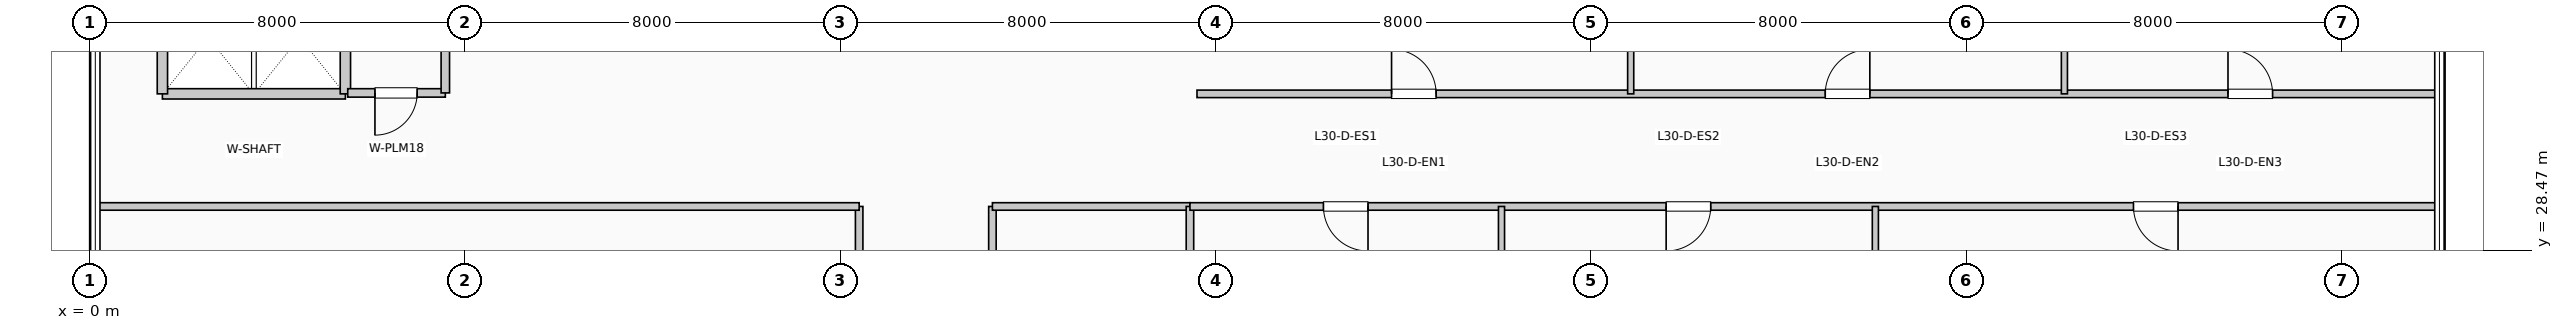
"""IFC4 building model, lengths in metres.
Left out: names, types, materials, properties, quantities, classifications, styles, units other than length and angle.
Written with IfcOpenShell. Run it as: python <this file> out.ifc"""

import sys

from ifc_helpers import new_model, si_unit, direction, frame, frame_2d, origin, place, context, subcontext, project, spatial, rectangle, extrude, element, fill, save


model = new_model("IFC4")
c1 = context("Model", 3, precision=1e-05, world=origin(), true_north=direction((0.0, 1.0)))
c2 = subcontext(c1, "Body", "Model", "MODEL_VIEW")
j1 = project(units=[si_unit("LENGTHUNIT", "METRE"), si_unit("PLANEANGLEUNIT", "RADIAN")], contexts=[c1])
p1 = place(None, origin())
s1 = spatial("IfcSite", under=j1, at=p1, CompositionType="ELEMENT")
p2 = place(p1, origin())
s2 = spatial("IfcBuilding", under=s1, at=p2, CompositionType="ELEMENT")
p3 = place(p2, frame((0.0, 0.0, 126.39)))
s3 = spatial("IfcBuildingStorey", under=s2, at=p3, CompositionType="ELEMENT", Elevation=126.39)
p4 = place(p3, frame((1.55, 31.8, 0.0), z_axis=(0.0, 0.0, 1.0), x_axis=(1.0, 0.0, 0.0)))
e1 = element("IfcWall", 1, at=p4, inside=s3, PredefinedType="PARTITIONING", context=c2, shape_type="SweptSolid", body=[
    extrude(rectangle(XDim=3.9, YDim=0.22, at=frame_2d((1.95, 0.0))), origin(), (0.0, 0.0, 1.0), 3.71),
])
for number, where, z_axis, x_axis in (
    (2, (1.55, 31.8, 0.0), (0.0, 0.0, 1.0), (0.0, 1.0, 0.0)),
    (3, (5.45, 31.8, 0.0), (0.0, 0.0, 1.0), (0.0, 1.0, 0.0)),
):
    element("IfcWall", number, at=place(p3, frame(where, z_axis=z_axis, x_axis=x_axis)), inside=s3, PredefinedType="PARTITIONING", context=c2, shape_type="SweptSolid", body=[
        extrude(rectangle(XDim=2.38, YDim=0.22, at=frame_2d((1.19, 0.0))), origin(), (0.0, 0.0, 1.0), 3.71),
    ])
p5 = place(p3, frame((5.5, 31.82, 0.0), z_axis=(0.0, 0.0, 1.0), x_axis=(1.0, 0.0, 0.0)))
e4 = element("IfcWall", 4, at=p5, inside=s3, PredefinedType="PLUMBINGWALL", context=c2, shape_type="SweptSolid", body=[
    extrude(rectangle(XDim=2.08, YDim=0.18, at=frame_2d((1.04, 0.0))), origin(), (0.0, 0.0, 1.0), 3.71),
])
p6 = place(p5, frame((1.48, 0.0, 0.0), z_axis=(0.0, 0.0, 1.0), x_axis=(-1.0, 0.0, 0.0)))
e5 = element("IfcOpeningElement", 5, at=p6, cuts=e4, PredefinedType="OPENING", context=c2, shape_type="SweptSolid", body=[
    extrude(rectangle(XDim=0.9, YDim=2.1, at=frame_2d((0.45, 1.05))), frame((0.0, 0.1, 0.0), z_axis=(0.0, -1.0, 0.0), x_axis=(1.0, 0.0, 0.0)), (0.0, 0.0, 1.0), 0.2),
])
p7 = place(p3, frame((7.58, 31.82, 0.0), z_axis=(0.0, 0.0, 1.0), x_axis=(0.0, 1.0, 0.0)))
e6 = element("IfcWall", 6, at=p7, inside=s3, PredefinedType="PLUMBINGWALL", context=c2, shape_type="SweptSolid", body=[
    extrude(rectangle(XDim=2.36, YDim=0.18, at=frame_2d((1.18, 0.0))), origin(), (0.0, 0.0, 1.0), 3.71),
])
p8 = place(p3, frame((16.4, 7.2, 0.0), z_axis=(0.0, 0.0, 1.0), x_axis=(0.0, 1.0, 0.0)))
e7 = element("IfcWall", 7, at=p8, inside=s3, PredefinedType="PARTITIONING", context=c2, shape_type="SweptSolid", body=[
    extrude(rectangle(XDim=22.2, YDim=0.16, at=frame_2d((11.1, 0.0))), origin(), (0.0, 0.0, 1.0), 3.71),
])
p9 = place(p8, frame((6.247, 0.0, 0.0), z_axis=(0.0, 0.0, 1.0), x_axis=(-1.0, 0.0, 0.0)))
e8 = element("IfcOpeningElement", 8, at=p9, cuts=e7, PredefinedType="OPENING", context=c2, shape_type="SweptSolid", body=[
    extrude(rectangle(XDim=0.95, YDim=2.15, at=frame_2d((0.475, 1.075))), frame((0.0, 0.09, 0.0), z_axis=(0.0, -1.0, 0.0), x_axis=(1.0, 0.0, 0.0)), (0.0, 0.0, 1.0), 0.18),
])
p10 = place(p8, frame((17.347, 0.0, 0.0), z_axis=(0.0, 0.0, 1.0), x_axis=(-1.0, 0.0, 0.0)))
e9 = element("IfcOpeningElement", 9, at=p10, cuts=e7, PredefinedType="OPENING", context=c2, shape_type="SweptSolid", body=[
    extrude(rectangle(XDim=0.95, YDim=2.15, at=frame_2d((0.475, 1.075))), frame((0.0, 0.09, 0.0), z_axis=(0.0, -1.0, 0.0), x_axis=(1.0, 0.0, 0.0)), (0.0, 0.0, 1.0), 0.18),
])
p11 = place(p3, frame((19.24, 7.2, 0.0), z_axis=(0.0, 0.0, 1.0), x_axis=(0.0, 1.0, 0.0)))
e10 = element("IfcWall", 10, at=p11, inside=s3, PredefinedType="PARTITIONING", context=c2, shape_type="SweptSolid", body=[
    extrude(rectangle(XDim=22.2, YDim=0.16, at=frame_2d((11.1, 0.0))), origin(), (0.0, 0.0, 1.0), 3.71),
])
p12 = place(p11, frame((4.52, 0.0, 0.0)))
e11 = element("IfcOpeningElement", 11, at=p12, cuts=e10, PredefinedType="OPENING", context=c2, shape_type="SweptSolid", body=[
    extrude(rectangle(XDim=0.95, YDim=2.15, at=frame_2d((0.475, 1.075))), frame((0.0, 0.09, 0.0), z_axis=(0.0, -1.0, 0.0), x_axis=(1.0, 0.0, 0.0)), (0.0, 0.0, 1.0), 0.18),
])
p13 = place(p11, frame((15.62, 0.0, 0.0)))
e12 = element("IfcOpeningElement", 12, at=p13, cuts=e10, PredefinedType="OPENING", context=c2, shape_type="SweptSolid", body=[
    extrude(rectangle(XDim=0.95, YDim=2.15, at=frame_2d((0.475, 1.075))), frame((0.0, 0.09, 0.0), z_axis=(0.0, -1.0, 0.0), x_axis=(1.0, 0.0, 0.0)), (0.0, 0.0, 1.0), 0.18),
])
p14 = place(p3, frame((0.19, 29.4, 0.0), z_axis=(0.0, 0.0, 1.0), x_axis=(1.0, 0.0, 0.0)))
e13 = element("IfcWall", 13, at=p14, inside=s3, PredefinedType="PARTITIONING", context=c2, shape_type="SweptSolid", body=[
    extrude(rectangle(XDim=16.21, YDim=0.16, at=frame_2d((8.105, 0.0))), origin(), (0.0, 0.0, 1.0), 3.365),
])
p15 = place(p3, frame((19.24, 29.4, 0.0), z_axis=(0.0, 0.0, 1.0), x_axis=(1.0, 0.0, 0.0)))
e14 = element("IfcWall", 14, at=p15, inside=s3, PredefinedType="PARTITIONING", context=c2, shape_type="SweptSolid", body=[
    extrude(rectangle(XDim=4.21, YDim=0.16, at=frame_2d((2.105, 0.0))), origin(), (0.0, 0.0, 1.0), 3.71),
])
p16 = place(p3, frame((23.45, 0.19, 0.0), z_axis=(0.0, 0.0, 1.0), x_axis=(0.0, 1.0, 0.0)))
e15 = element("IfcWall", 15, at=p16, inside=s3, PredefinedType="PARTITIONING", context=c2, shape_type="SweptSolid", body=[
    extrude(rectangle(XDim=29.21, YDim=0.16, at=frame_2d((14.605, 0.0))), origin(), (0.0, 0.0, 1.0), 3.045),
])
p17 = place(p3, frame((23.45, 29.4, 0.0), z_axis=(0.0, 0.0, 1.0), x_axis=(1.0, 0.0, 0.0)))
e16 = element("IfcWall", 16, at=p17, inside=s3, PredefinedType="PARTITIONING", context=c2, shape_type="SweptSolid", body=[
    extrude(rectangle(XDim=26.56, YDim=0.16, at=frame_2d((13.28, 0.0))), origin(), (0.0, 0.0, 1.0), 3.365),
])
p18 = place(p17, frame((3.795, 0.0, 0.0), z_axis=(0.0, 0.0, 1.0), x_axis=(-1.0, 0.0, 0.0)))
e17 = element("IfcOpeningElement", 17, at=p18, cuts=e16, PredefinedType="OPENING", context=c2, shape_type="SweptSolid", body=[
    extrude(rectangle(XDim=0.95, YDim=2.15, at=frame_2d((0.475, 1.075))), frame((0.0, 0.09, 0.0), z_axis=(0.0, -1.0, 0.0), x_axis=(1.0, 0.0, 0.0)), (0.0, 0.0, 1.0), 0.18),
])
p19 = place(p17, frame((11.099, 0.0, 0.0), z_axis=(0.0, 0.0, 1.0), x_axis=(-1.0, 0.0, 0.0)))
e18 = element("IfcOpeningElement", 18, at=p19, cuts=e16, PredefinedType="OPENING", context=c2, shape_type="SweptSolid", body=[
    extrude(rectangle(XDim=0.95, YDim=2.15, at=frame_2d((0.475, 1.075))), frame((0.0, 0.09, 0.0), z_axis=(0.0, -1.0, 0.0), x_axis=(1.0, 0.0, 0.0)), (0.0, 0.0, 1.0), 0.18),
])
p20 = place(p17, frame((21.059, 0.0, 0.0), z_axis=(0.0, 0.0, 1.0), x_axis=(-1.0, 0.0, 0.0)))
e19 = element("IfcOpeningElement", 19, at=p20, cuts=e16, PredefinedType="OPENING", context=c2, shape_type="SweptSolid", body=[
    extrude(rectangle(XDim=0.95, YDim=2.15, at=frame_2d((0.475, 1.075))), frame((0.0, 0.09, 0.0), z_axis=(0.0, -1.0, 0.0), x_axis=(1.0, 0.0, 0.0)), (0.0, 0.0, 1.0), 0.18),
])
p21 = place(p3, frame((23.6, 31.8, 0.0), z_axis=(0.0, 0.0, 1.0), x_axis=(1.0, 0.0, 0.0)))
e20 = element("IfcWall", 20, at=p21, inside=s3, PredefinedType="PARTITIONING", context=c2, shape_type="SweptSolid", body=[
    extrude(rectangle(XDim=26.41, YDim=0.16, at=frame_2d((13.205, 0.0))), origin(), (0.0, 0.0, 1.0), 3.71),
])
p22 = place(p21, frame((4.147, 0.0, 0.0)))
e21 = element("IfcOpeningElement", 21, at=p22, cuts=e20, PredefinedType="OPENING", context=c2, shape_type="SweptSolid", body=[
    extrude(rectangle(XDim=0.95, YDim=2.15, at=frame_2d((0.475, 1.075))), frame((0.0, 0.09, 0.0), z_axis=(0.0, -1.0, 0.0), x_axis=(1.0, 0.0, 0.0)), (0.0, 0.0, 1.0), 0.18),
])
p23 = place(p21, frame((13.39, 0.0, 0.0)))
e22 = element("IfcOpeningElement", 22, at=p23, cuts=e20, PredefinedType="OPENING", context=c2, shape_type="SweptSolid", body=[
    extrude(rectangle(XDim=0.95, YDim=2.15, at=frame_2d((0.475, 1.075))), frame((0.0, 0.09, 0.0), z_axis=(0.0, -1.0, 0.0), x_axis=(1.0, 0.0, 0.0)), (0.0, 0.0, 1.0), 0.18),
])
p24 = place(p21, frame((21.973, 0.0, 0.0)))
e23 = element("IfcOpeningElement", 23, at=p24, cuts=e20, PredefinedType="OPENING", context=c2, shape_type="SweptSolid", body=[
    extrude(rectangle(XDim=0.95, YDim=2.15, at=frame_2d((0.475, 1.075))), frame((0.0, 0.09, 0.0), z_axis=(0.0, -1.0, 0.0), x_axis=(1.0, 0.0, 0.0)), (0.0, 0.0, 1.0), 0.18),
])
for number, where, z_axis, x_axis in (
    (24, (30.09, 22.19, 0.0), (0.0, 0.0, 1.0), (0.0, 1.0, 0.0)),
    (25, (38.058, 22.19, 0.0), (0.0, 0.0, 1.0), (0.0, 1.0, 0.0)),
):
    element("IfcWall", number, at=place(p3, frame(where, z_axis=z_axis, x_axis=x_axis)), inside=s3, PredefinedType="PARTITIONING", context=c2, shape_type="SweptSolid", body=[
        extrude(rectangle(XDim=7.21, YDim=0.13, at=frame_2d((3.605, 0.0))), origin(), (0.0, 0.0, 1.0), 3.71),
    ])
for number, where, z_axis, x_axis in (
    (26, (32.844, 31.8, 0.0), (0.0, 0.0, 1.0), (0.0, 1.0, 0.0)),
    (27, (42.087, 31.8, 0.0), (0.0, 0.0, 1.0), (0.0, 1.0, 0.0)),
):
    element("IfcWall", number, at=place(p3, frame(where, z_axis=z_axis, x_axis=x_axis)), inside=s3, PredefinedType="PARTITIONING", context=c2, shape_type="SweptSolid", body=[
        extrude(rectangle(XDim=14.01, YDim=0.13, at=frame_2d((7.005, 0.0))), origin(), (0.0, 0.0, 1.0), 3.71),
    ])
p25 = place(p6, origin())
e28 = element("IfcDoor", 28, at=p25, inside=s3, OperationType="SINGLE_SWING_LEFT", PredefinedType="DOOR", context=c2, shape_type="SweptSolid", body=[
    extrude(rectangle(XDim=0.9, YDim=2.1, at=frame_2d((0.45, 1.05))), frame((0.0, 0.025, 0.0), z_axis=(0.0, -1.0, 0.0), x_axis=(1.0, 0.0, 0.0)), (0.0, 0.0, 1.0), 0.05),
])
fill(e5, e28)
p26 = place(p18, origin())
e29 = element("IfcDoor", 29, at=p26, inside=s3, OperationType="SINGLE_SWING_RIGHT", PredefinedType="DOOR", context=c2, shape_type="SweptSolid", body=[
    extrude(rectangle(XDim=0.95, YDim=2.15, at=frame_2d((0.475, 1.075))), frame((0.0, 0.025, 0.0), z_axis=(0.0, -1.0, 0.0), x_axis=(1.0, 0.0, 0.0)), (0.0, 0.0, 1.0), 0.05),
])
fill(e17, e29)
p27 = place(p19, origin())
e30 = element("IfcDoor", 30, at=p27, inside=s3, OperationType="SINGLE_SWING_LEFT", PredefinedType="DOOR", context=c2, shape_type="SweptSolid", body=[
    extrude(rectangle(XDim=0.95, YDim=2.15, at=frame_2d((0.475, 1.075))), frame((0.0, 0.025, 0.0), z_axis=(0.0, -1.0, 0.0), x_axis=(1.0, 0.0, 0.0)), (0.0, 0.0, 1.0), 0.05),
])
fill(e18, e30)
p28 = place(p20, origin())
e31 = element("IfcDoor", 31, at=p28, inside=s3, OperationType="SINGLE_SWING_RIGHT", PredefinedType="DOOR", context=c2, shape_type="SweptSolid", body=[
    extrude(rectangle(XDim=0.95, YDim=2.15, at=frame_2d((0.475, 1.075))), frame((0.0, 0.025, 0.0), z_axis=(0.0, -1.0, 0.0), x_axis=(1.0, 0.0, 0.0)), (0.0, 0.0, 1.0), 0.05),
])
fill(e19, e31)
p29 = place(p22, origin())
e32 = element("IfcDoor", 32, at=p29, inside=s3, OperationType="SINGLE_SWING_LEFT", PredefinedType="DOOR", context=c2, shape_type="SweptSolid", body=[
    extrude(rectangle(XDim=0.95, YDim=2.15, at=frame_2d((0.475, 1.075))), frame((0.0, 0.025, 0.0), z_axis=(0.0, -1.0, 0.0), x_axis=(1.0, 0.0, 0.0)), (0.0, 0.0, 1.0), 0.05),
])
fill(e21, e32)
p30 = place(p23, origin())
e33 = element("IfcDoor", 33, at=p30, inside=s3, OperationType="SINGLE_SWING_RIGHT", PredefinedType="DOOR", context=c2, shape_type="SweptSolid", body=[
    extrude(rectangle(XDim=0.95, YDim=2.15, at=frame_2d((0.475, 1.075))), frame((0.0, 0.025, 0.0), z_axis=(0.0, -1.0, 0.0), x_axis=(1.0, 0.0, 0.0)), (0.0, 0.0, 1.0), 0.05),
])
fill(e22, e33)
p31 = place(p24, origin())
e34 = element("IfcDoor", 34, at=p31, inside=s3, OperationType="SINGLE_SWING_LEFT", PredefinedType="DOOR", context=c2, shape_type="SweptSolid", body=[
    extrude(rectangle(XDim=0.95, YDim=2.15, at=frame_2d((0.475, 1.075))), frame((0.0, 0.025, 0.0), z_axis=(0.0, -1.0, 0.0), x_axis=(1.0, 0.0, 0.0)), (0.0, 0.0, 1.0), 0.05),
])
fill(e23, e34)
save(model, sys.argv[1])
